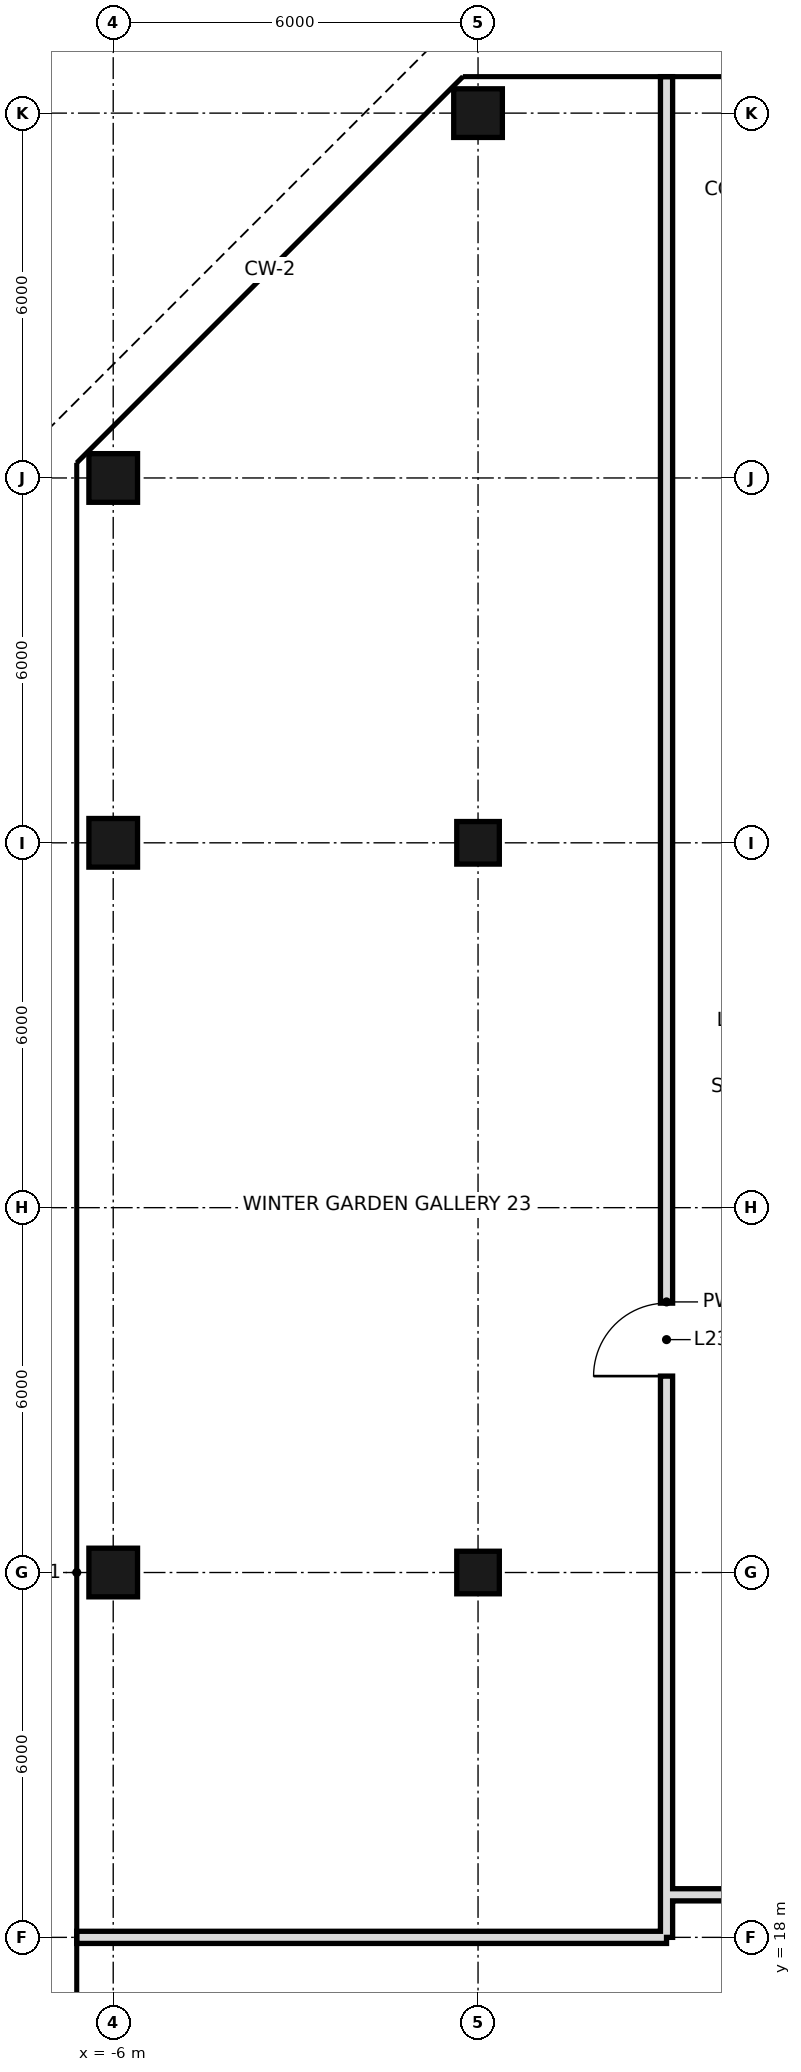
"""IFC4 building model, lengths in metres.
Left out: names, types, materials, properties, quantities, classifications, styles, units other than length and angle.
Written with IfcOpenShell. Run it as: python <this file> out.ifc"""

import sys

from ifc_helpers import new_model, si_unit, direction, frame, frame_2d, origin, origin_2d, place, context, subcontext, project, spatial, rectangle, hollow_rectangle, extrude, element, fill, save


model = new_model("IFC4")
c1 = context("Model", 3, precision=1e-05, world=origin(), true_north=direction((0.0, 1.0)))
c2 = subcontext(c1, "Body", "Model", "MODEL_VIEW")
j1 = project(units=[si_unit("LENGTHUNIT", "METRE"), si_unit("PLANEANGLEUNIT", "RADIAN")], contexts=[c1])
p1 = place(None, origin())
s1 = spatial("IfcSite", under=j1, at=p1, CompositionType="ELEMENT")
p2 = place(p1, origin())
s2 = spatial("IfcBuilding", under=s1, at=p2, CompositionType="ELEMENT")
p3 = place(p2, frame((0.0, 0.0, 107.0)))
s3 = spatial("IfcBuildingStorey", under=s2, at=p3, CompositionType="ELEMENT", Elevation=107.0)
for number, where, z_axis, x_axis in (
    (1, (-6.0, 24.0, 0.0), (0.0, 0.0, 1.0), (1.0, 0.0, 0.0)),
    (2, (-6.0, 36.0, 0.0), (0.0, 0.0, 1.0), (1.0, 0.0, 0.0)),
    (3, (-6.0, 42.0, 0.0), (0.0, 0.0, 1.0), (1.0, 0.0, 0.0)),
):
    element("IfcColumn", number, at=place(p3, frame(where, z_axis=z_axis, x_axis=x_axis)), inside=s3, PredefinedType="COLUMN", context=c2, shape_type="SweptSolid", body=[
        extrude(hollow_rectangle(XDim=0.8, YDim=0.8, WallThickness=0.04, at=origin_2d()), origin(), (0.0, 0.0, 1.0), 3.6),
    ])
for number, where, z_axis, x_axis in (
    (4, (0.0, 24.0, 0.0), (0.0, 0.0, 1.0), (1.0, 0.0, 0.0)),
    (5, (0.0, 36.0, 0.0), (0.0, 0.0, 1.0), (1.0, 0.0, 0.0)),
):
    element("IfcColumn", number, at=place(p3, frame(where, z_axis=z_axis, x_axis=x_axis)), inside=s3, PredefinedType="COLUMN", context=c2, shape_type="SweptSolid", body=[
        extrude(hollow_rectangle(XDim=0.7, YDim=0.7, WallThickness=0.036, at=origin_2d()), origin(), (0.0, 0.0, 1.0), 3.6),
    ])
p4 = place(p3, frame((0.0, 48.0, 0.0), z_axis=(0.0, 0.0, 1.0), x_axis=(1.0, 0.0, 0.0)))
e6 = element("IfcColumn", 6, at=p4, inside=s3, PredefinedType="COLUMN", context=c2, shape_type="SweptSolid", body=[
    extrude(hollow_rectangle(XDim=0.8, YDim=0.8, WallThickness=0.04, at=origin_2d()), origin(), (0.0, 0.0, 1.0), 3.6),
])
p5 = place(p3, frame((3.1, 18.0, 0.0), z_axis=(0.0, 0.0, 1.0), x_axis=(0.0, 1.0, 0.0)))
e7 = element("IfcWall", 7, at=p5, inside=s3, PredefinedType="SOLIDWALL", context=c2, shape_type="SweptSolid", body=[
    extrude(rectangle(XDim=30.6, YDim=0.2, at=frame_2d((15.3, 0.0))), origin(), (0.0, 0.0, 1.0), 2.72),
])
p6 = place(p5, frame((9.23, 0.0, 0.0)))
e8 = element("IfcOpeningElement", 8, at=p6, cuts=e7, PredefinedType="OPENING", context=c2, shape_type="SweptSolid", body=[
    extrude(rectangle(XDim=1.2, YDim=2.4, at=frame_2d((0.6, 1.2))), frame((0.0, 0.11, 0.0), z_axis=(0.0, -1.0, 0.0), x_axis=(1.0, 0.0, 0.0)), (0.0, 0.0, 1.0), 0.22),
])
p7 = place(p3, frame((-6.6, 18.0, 0.0), z_axis=(0.0, 0.0, 1.0), x_axis=(1.0, 0.0, 0.0)))
e9 = element("IfcWall", 9, at=p7, inside=s3, PredefinedType="SOLIDWALL", context=c2, shape_type="SweptSolid", body=[
    extrude(rectangle(XDim=9.7, YDim=0.2, at=frame_2d((4.85, 0.0))), origin(), (0.0, 0.0, 1.0), 2.72),
])
p8 = place(p3, frame((3.1, 18.7, 0.0), z_axis=(0.0, 0.0, 1.0), x_axis=(1.0, 0.0, 0.0)))
e10 = element("IfcWall", 10, at=p8, inside=s3, PredefinedType="SOLIDWALL", context=c2, shape_type="SweptSolid", body=[
    extrude(rectangle(XDim=13.1, YDim=0.2, at=frame_2d((6.55, 0.0))), origin(), (0.0, 0.0, 1.0), 2.72),
])
p9 = place(p6, origin())
e11 = element("IfcDoor", 11, at=p9, inside=s3, OperationType="SINGLE_SWING_LEFT", PredefinedType="DOOR", context=c2, shape_type="SweptSolid", body=[
    extrude(rectangle(XDim=1.2, YDim=2.4, at=frame_2d((0.6, 1.2))), frame((0.0, 0.025, 0.0), z_axis=(0.0, -1.0, 0.0), x_axis=(1.0, 0.0, 0.0)), (0.0, 0.0, 1.0), 0.05),
])
fill(e8, e11)
save(model, sys.argv[1])
